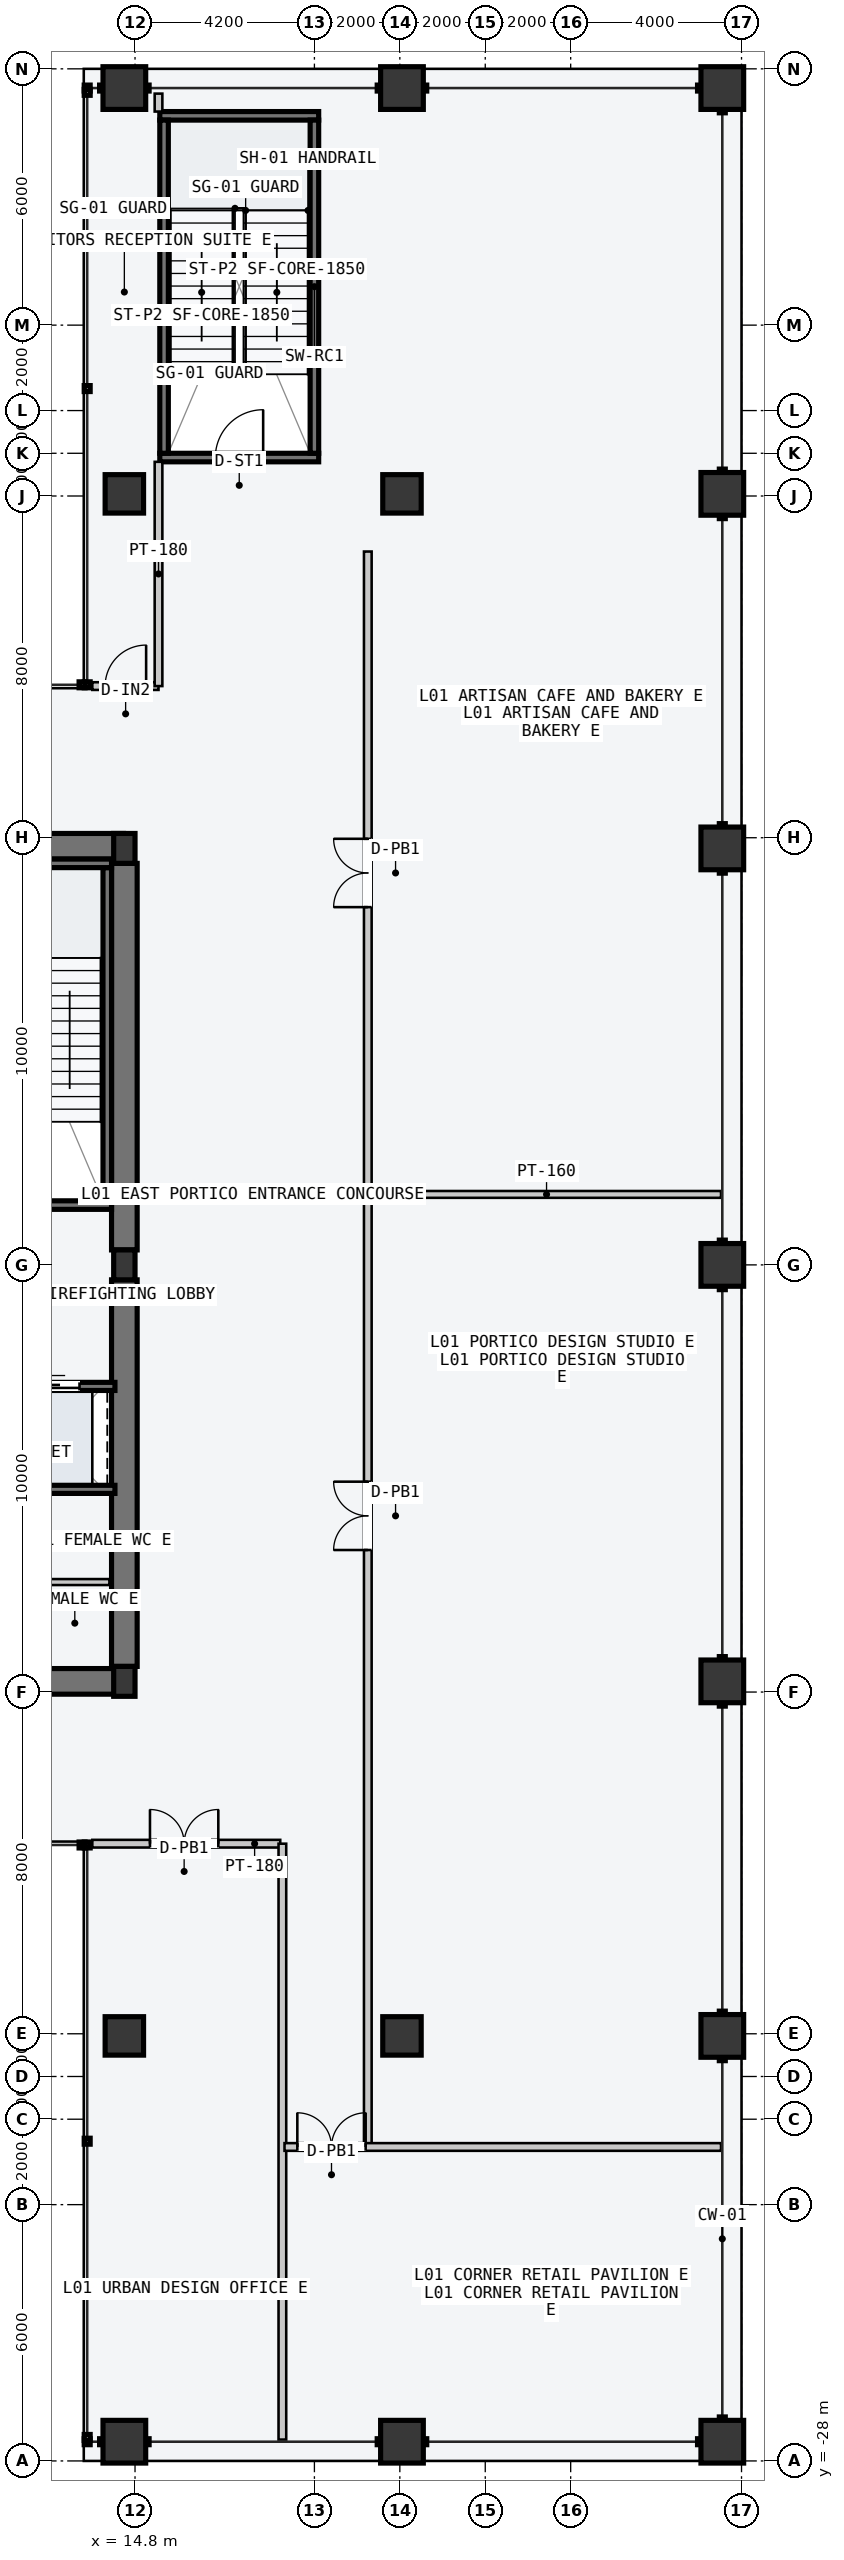
"""IFC4 building model, lengths in metres.
Left out: names, types, materials, properties, quantities, classifications, styles, units other than length and angle.
Written with IfcOpenShell. Run it as: python <this file> out.ifc"""

import sys

from ifc_helpers import new_model, si_unit, direction, frame, frame_2d, origin, origin_2d, place, context, subcontext, project, spatial, rectangle, hollow_rectangle, i_section, extrude, element, fill, save


model = new_model("IFC4")
c1 = context("Model", 3, precision=1e-05, world=origin(), true_north=direction((0.0, 1.0)))
c2 = subcontext(c1, "Body", "Model", "MODEL_VIEW")
j1 = project(units=[si_unit("LENGTHUNIT", "METRE"), si_unit("PLANEANGLEUNIT", "RADIAN")], contexts=[c1])
p1 = place(None, origin())
s1 = spatial("IfcSite", under=j1, at=p1, CompositionType="ELEMENT")
p2 = place(p1, origin())
s2 = spatial("IfcBuilding", under=s1, at=p2, CompositionType="ELEMENT")
p3 = place(p2, frame((0.0, 0.0, 4.8)))
s3 = spatial("IfcBuildingStorey", under=s2, at=p3, CompositionType="ELEMENT", Elevation=4.8)
for number, where, z_axis, x_axis in (
    (1, (8.07, -9.75, -0.22), (0.0, 0.0, 1.0), (1.0, 0.0, 0.0)),
    (2, (8.07, 9.8, -0.22), (0.0, 0.0, 1.0), (1.0, 0.0, 0.0)),
):
    element("IfcWall", number, at=place(p3, frame(where, z_axis=z_axis, x_axis=x_axis)), inside=s3, PredefinedType="SHEAR", context=c2, shape_type="SweptSolid", body=[
        extrude(rectangle(XDim=6.46, YDim=0.6, at=frame_2d((3.23, 0.0))), origin(), (0.0, 0.0, 1.0), 4.8),
    ])
for number, where, z_axis, x_axis in (
    (3, (14.55, -9.4, -0.22), (0.0, 0.0, 1.0), (0.0, 1.0, 0.0)),
    (4, (14.55, 0.35, -0.22), (0.0, 0.0, 1.0), (0.0, 1.0, 0.0)),
):
    element("IfcWall", number, at=place(p3, frame(where, z_axis=z_axis, x_axis=x_axis)), inside=s3, PredefinedType="SHEAR", context=c2, shape_type="SweptSolid", body=[
        extrude(rectangle(XDim=9.05, YDim=0.6, at=frame_2d((4.525, 0.0))), origin(), (0.0, 0.0, 1.0), 4.8),
    ])
p4 = place(p3, frame((14.15, 1.5, -0.22), z_axis=(0.0, 0.0, 1.0), x_axis=(0.0, 1.0, 0.0)))
e5 = element("IfcWall", 5, at=p4, inside=s3, PredefinedType="SOLIDWALL", context=c2, shape_type="SweptSolid", body=[
    extrude(rectangle(XDim=7.8, YDim=0.2, at=frame_2d((3.9, 0.0))), origin(), (0.0, 0.0, 1.0), 4.8),
])
p5 = place(p3, frame((10.15, 1.4, -0.22), z_axis=(0.0, 0.0, 1.0), x_axis=(1.0, 0.0, 0.0)))
e6 = element("IfcWall", 6, at=p5, inside=s3, PredefinedType="SOLIDWALL", context=c2, shape_type="SweptSolid", body=[
    extrude(rectangle(XDim=4.1, YDim=0.2, at=frame_2d((2.05, 0.0))), origin(), (0.0, 0.0, 1.0), 4.8),
])
p6 = place(p5, frame((1.5, 0.0, 0.22)))
e7 = element("IfcOpeningElement", 7, at=p6, cuts=e6, PredefinedType="OPENING", context=c2, shape_type="SweptSolid", body=[
    extrude(rectangle(XDim=1.12, YDim=2.18, at=frame_2d((0.56, 1.09))), frame((0.0, 0.11, 0.0), z_axis=(0.0, -1.0, 0.0), x_axis=(1.0, 0.0, 0.0)), (0.0, 0.0, 1.0), 0.22),
])
p7 = place(p3, frame((10.15, 9.4, -0.22), z_axis=(0.0, 0.0, 1.0), x_axis=(1.0, 0.0, 0.0)))
e8 = element("IfcWall", 8, at=p7, inside=s3, PredefinedType="SOLIDWALL", context=c2, shape_type="SweptSolid", body=[
    extrude(rectangle(XDim=4.1, YDim=0.2, at=frame_2d((2.05, 0.0))), origin(), (0.0, 0.0, 1.0), 4.8),
])
p8 = place(p3, frame((15.38, 18.9, -0.22), z_axis=(0.0, 0.0, 1.0), x_axis=(1.0, 0.0, 0.0)))
e9 = element("IfcWall", 9, at=p8, inside=s3, PredefinedType="SOLIDWALL", context=c2, shape_type="SweptSolid", body=[
    extrude(rectangle(XDim=3.72, YDim=0.2, at=frame_2d((1.86, 0.0))), origin(), (0.0, 0.0, 1.0), 4.8),
])
p9 = place(p8, frame((1.3, 0.0, 0.22)))
e10 = element("IfcOpeningElement", 10, at=p9, cuts=e9, PredefinedType="OPENING", context=c2, shape_type="SweptSolid", body=[
    extrude(rectangle(XDim=1.12, YDim=2.18, at=frame_2d((0.56, 1.09))), frame((0.0, 0.11, 0.0), z_axis=(0.0, -1.0, 0.0), x_axis=(1.0, 0.0, 0.0)), (0.0, 0.0, 1.0), 0.22),
])
p10 = place(p3, frame((15.38, 26.9, -0.22), z_axis=(0.0, 0.0, 1.0), x_axis=(1.0, 0.0, 0.0)))
e11 = element("IfcWall", 11, at=p10, inside=s3, PredefinedType="SOLIDWALL", context=c2, shape_type="SweptSolid", body=[
    extrude(rectangle(XDim=3.72, YDim=0.2, at=frame_2d((1.86, 0.0))), origin(), (0.0, 0.0, 1.0), 4.8),
])
for number, where, z_axis, x_axis in (
    (12, (15.48, 19.0, -0.22), (0.0, 0.0, 1.0), (0.0, 1.0, 0.0)),
    (13, (19.0, 19.0, -0.22), (0.0, 0.0, 1.0), (0.0, 1.0, 0.0)),
):
    element("IfcWall", number, at=place(p3, frame(where, z_axis=z_axis, x_axis=x_axis)), inside=s3, PredefinedType="SOLIDWALL", context=c2, shape_type="SweptSolid", body=[
        extrude(rectangle(XDim=7.8, YDim=0.2, at=frame_2d((3.9, 0.0))), origin(), (0.0, 0.0, 1.0), 4.8),
    ])
for number, where, z_axis, x_axis in (
    (14, (14.55, -9.75, 0.0), (0.0, 0.0, 1.0), (1.0, 0.0, 0.0)),
    (15, (14.55, 0.0, 0.0), (0.0, 0.0, 1.0), (1.0, 0.0, 0.0)),
    (16, (14.55, 9.75, 0.0), (0.0, 0.0, 1.0), (1.0, 0.0, 0.0)),
):
    element("IfcColumn", number, at=place(p3, frame(where, z_axis=z_axis, x_axis=x_axis)), inside=s3, PredefinedType="COLUMN", context=c2, shape_type="SweptSolid", body=[
        extrude(i_section(OverallWidth=0.5, OverallDepth=0.7, WebThickness=0.028, FlangeThickness=0.045, at=origin_2d()), origin(), (0.0, 0.0, 1.0), 4.8),
    ])
for number, where, z_axis, x_axis in (
    (17, (14.55, -18.05, 0.0), (0.0, 0.0, 1.0), (1.0, 0.0, 0.0)),
    (18, (21.05, -18.05, 0.0), (0.0, 0.0, 1.0), (1.0, 0.0, 0.0)),
    (19, (14.55, 18.05, 0.0), (0.0, 0.0, 1.0), (1.0, 0.0, 0.0)),
    (20, (21.05, 18.05, 0.0), (0.0, 0.0, 1.0), (1.0, 0.0, 0.0)),
):
    element("IfcColumn", number, at=place(p3, frame(where, z_axis=z_axis, x_axis=x_axis)), inside=s3, PredefinedType="COLUMN", context=c2, shape_type="SweptSolid", body=[
        extrude(hollow_rectangle(XDim=0.9, YDim=0.9, WallThickness=0.045, at=origin_2d()), origin(), (0.0, 0.0, 1.0), 4.8),
    ])
for number, where, z_axis, x_axis in (
    (21, (14.55, -27.55, 0.0), (0.0, 0.0, 1.0), (1.0, 0.0, 0.0)),
    (22, (21.05, -27.55, 0.0), (0.0, 0.0, 1.0), (1.0, 0.0, 0.0)),
    (23, (28.55, -27.55, 0.0), (0.0, 0.0, 1.0), (1.0, 0.0, 0.0)),
    (24, (14.55, 27.55, 0.0), (0.0, 0.0, 1.0), (1.0, 0.0, 0.0)),
    (25, (21.05, 27.55, 0.0), (0.0, 0.0, 1.0), (1.0, 0.0, 0.0)),
    (26, (28.55, 27.55, 0.0), (0.0, 0.0, 1.0), (1.0, 0.0, 0.0)),
    (27, (28.55, -18.05, 0.0), (0.0, 0.0, 1.0), (0.0, 1.0, 0.0)),
    (28, (28.55, -9.75, 0.0), (0.0, 0.0, 1.0), (0.0, 1.0, 0.0)),
    (29, (28.55, 0.0, 0.0), (0.0, 0.0, 1.0), (0.0, 1.0, 0.0)),
    (30, (28.55, 9.75, 0.0), (0.0, 0.0, 1.0), (0.0, 1.0, 0.0)),
    (31, (28.55, 18.05, 0.0), (0.0, 0.0, 1.0), (0.0, 1.0, 0.0)),
):
    element("IfcColumn", number, at=place(p3, frame(where, z_axis=z_axis, x_axis=x_axis)), inside=s3, PredefinedType="COLUMN", context=c2, shape_type="SweptSolid", body=[
        extrude(hollow_rectangle(XDim=1.0, YDim=1.0, WallThickness=0.05, at=origin_2d()), origin(), (0.0, 0.0, 1.0), 4.8),
    ])
p11 = place(p3, frame((11.65, -2.845, -0.22), z_axis=(0.0, 0.0, 1.0), x_axis=(1.0, 0.0, 0.0)))
e32 = element("IfcWall", 32, at=p11, inside=s3, PredefinedType="SOLIDWALL", context=c2, shape_type="SweptSolid", body=[
    extrude(rectangle(XDim=2.68, YDim=0.19, at=frame_2d((1.34, 0.0))), origin(), (0.0, 0.0, 1.0), 4.8),
])
p12 = place(p11, frame((0.65, 0.0, 0.22)))
e33 = element("IfcOpeningElement", 33, at=p12, cuts=e32, PredefinedType="OPENING", context=c2, shape_type="SweptSolid", body=[
    extrude(rectangle(XDim=1.2, YDim=2.2, at=frame_2d((0.6, 1.1))), frame((0.0, 0.105, 0.0), z_axis=(0.0, -1.0, 0.0), x_axis=(1.0, 0.0, 0.0)), (0.0, 0.0, 1.0), 0.21),
])
p13 = place(p3, frame((11.65, -5.255, -0.22), z_axis=(0.0, 0.0, 1.0), x_axis=(1.0, 0.0, 0.0)))
e34 = element("IfcWall", 34, at=p13, inside=s3, PredefinedType="SOLIDWALL", context=c2, shape_type="SweptSolid", body=[
    extrude(rectangle(XDim=2.68, YDim=0.19, at=frame_2d((1.34, 0.0))), origin(), (0.0, 0.0, 1.0), 4.8),
])
p14 = place(p3, frame((11.7, -7.425, 0.0), z_axis=(0.0, 0.0, 1.0), x_axis=(1.0, 0.0, 0.0)))
e35 = element("IfcWall", 35, at=p14, inside=s3, PredefinedType="PARTITIONING", context=c2, shape_type="SweptSolid", body=[
    extrude(rectangle(XDim=2.5, YDim=0.14, at=frame_2d((1.25, 0.0))), origin(), (0.0, 0.0, 1.0), 4.58),
])
p15 = place(p3, frame((20.35, 1.65, 0.0), z_axis=(0.0, 0.0, 1.0), x_axis=(1.0, 0.0, 0.0)))
e36 = element("IfcWall", 36, at=p15, inside=s3, PredefinedType="PARTITIONING", context=c2, shape_type="SweptSolid", body=[
    extrude(rectangle(XDim=8.17, YDim=0.16, at=frame_2d((4.085, 0.0))), origin(), (0.0, 0.0, 1.0), 4.58),
])
p16 = place(p3, frame((20.25, -20.6, 0.0), z_axis=(0.0, 0.0, 1.0), x_axis=(0.0, 1.0, 0.0)))
e37 = element("IfcWall", 37, at=p16, inside=s3, PredefinedType="PARTITIONING", context=c2, shape_type="SweptSolid", body=[
    extrude(rectangle(XDim=37.3, YDim=0.18, at=frame_2d((18.65, 0.0))), origin(), (0.0, 0.0, 1.0), 4.58),
])
p17 = place(p16, frame((13.925, 0.0, 0.0)))
e38 = element("IfcOpeningElement", 38, at=p17, cuts=e37, PredefinedType="OPENING", context=c2, shape_type="SweptSolid", body=[
    extrude(rectangle(XDim=1.6, YDim=2.3, at=frame_2d((0.8, 1.15))), frame((0.0, 0.1, 0.0), z_axis=(0.0, -1.0, 0.0), x_axis=(1.0, 0.0, 0.0)), (0.0, 0.0, 1.0), 0.2),
])
p18 = place(p16, frame((28.975, 0.0, 0.0)))
e39 = element("IfcOpeningElement", 39, at=p18, cuts=e37, PredefinedType="OPENING", context=c2, shape_type="SweptSolid", body=[
    extrude(rectangle(XDim=1.6, YDim=2.3, at=frame_2d((0.8, 1.15))), frame((0.0, 0.1, 0.0), z_axis=(0.0, -1.0, 0.0), x_axis=(1.0, 0.0, 0.0)), (0.0, 0.0, 1.0), 0.2),
])
p19 = place(p3, frame((13.8, -13.55, 0.0), z_axis=(0.0, 0.0, 1.0), x_axis=(1.0, 0.0, 0.0)))
e40 = element("IfcWall", 40, at=p19, inside=s3, PredefinedType="PARTITIONING", context=c2, shape_type="SweptSolid", body=[
    extrude(rectangle(XDim=4.4, YDim=0.18, at=frame_2d((2.2, 0.0))), origin(), (0.0, 0.0, 1.0), 4.58),
])
p20 = place(p19, frame((1.35, 0.0, 0.0)))
e41 = element("IfcOpeningElement", 41, at=p20, cuts=e40, PredefinedType="OPENING", context=c2, shape_type="SweptSolid", body=[
    extrude(rectangle(XDim=1.6, YDim=2.3, at=frame_2d((0.8, 1.15))), frame((0.0, 0.1, 0.0), z_axis=(0.0, -1.0, 0.0), x_axis=(1.0, 0.0, 0.0)), (0.0, 0.0, 1.0), 0.2),
])
p21 = place(p3, frame((18.25, -27.5, 0.0), z_axis=(0.0, 0.0, 1.0), x_axis=(0.0, 1.0, 0.0)))
e42 = element("IfcWall", 42, at=p21, inside=s3, PredefinedType="PARTITIONING", context=c2, shape_type="SweptSolid", body=[
    extrude(rectangle(XDim=13.95, YDim=0.18, at=frame_2d((6.975, 0.0))), origin(), (0.0, 0.0, 1.0), 4.58),
])
p22 = place(p3, frame((18.3, -20.65, 0.0), z_axis=(0.0, 0.0, 1.0), x_axis=(1.0, 0.0, 0.0)))
e43 = element("IfcWall", 43, at=p22, inside=s3, PredefinedType="PARTITIONING", context=c2, shape_type="SweptSolid", body=[
    extrude(rectangle(XDim=10.22, YDim=0.18, at=frame_2d((5.11, 0.0))), origin(), (0.0, 0.0, 1.0), 4.58),
])
p23 = place(p22, frame((0.3, 0.0, 0.0)))
e44 = element("IfcOpeningElement", 44, at=p23, cuts=e43, PredefinedType="OPENING", context=c2, shape_type="SweptSolid", body=[
    extrude(rectangle(XDim=1.6, YDim=2.3, at=frame_2d((0.8, 1.15))), frame((0.0, 0.1, 0.0), z_axis=(0.0, -1.0, 0.0), x_axis=(1.0, 0.0, 0.0)), (0.0, 0.0, 1.0), 0.2),
])
p24 = place(p3, frame((13.8, 13.55, 0.0), z_axis=(0.0, 0.0, 1.0), x_axis=(1.0, 0.0, 0.0)))
e45 = element("IfcWall", 45, at=p24, inside=s3, PredefinedType="PARTITIONING", context=c2, shape_type="SweptSolid", body=[
    extrude(rectangle(XDim=1.55, YDim=0.18, at=frame_2d((0.775, 0.0))), origin(), (0.0, 0.0, 1.0), 4.58),
])
p25 = place(p24, frame((0.3, 0.0, 0.0)))
e46 = element("IfcOpeningElement", 46, at=p25, cuts=e45, PredefinedType="OPENING", context=c2, shape_type="SweptSolid", body=[
    extrude(rectangle(XDim=0.96, YDim=2.18, at=frame_2d((0.48, 1.09))), frame((0.0, 0.1, 0.0), z_axis=(0.0, -1.0, 0.0), x_axis=(1.0, 0.0, 0.0)), (0.0, 0.0, 1.0), 0.2),
])
p26 = place(p3, frame((15.35, 13.55, 0.0), z_axis=(0.0, 0.0, 1.0), x_axis=(0.0, 1.0, 0.0)))
e47 = element("IfcWall", 47, at=p26, inside=s3, PredefinedType="PARTITIONING", context=c2, shape_type="SweptSolid", body=[
    extrude(rectangle(XDim=5.25, YDim=0.18, at=frame_2d((2.625, 0.0))), origin(), (0.0, 0.0, 1.0), 4.58),
])
p27 = place(p3, frame((15.35, 27.0, 0.0), z_axis=(0.0, 0.0, 1.0), x_axis=(0.0, 1.0, 0.0)))
e48 = element("IfcWall", 48, at=p27, inside=s3, PredefinedType="PARTITIONING", context=c2, shape_type="SweptSolid", body=[
    extrude(rectangle(XDim=0.42, YDim=0.18, at=frame_2d((0.21, 0.0))), origin(), (0.0, 0.0, 1.0), 4.58),
])
p28 = place(p9, origin())
e49 = element("IfcDoor", 49, at=p28, inside=s3, OperationType="SINGLE_SWING_RIGHT", PredefinedType="DOOR", context=c2, shape_type="SweptSolid", body=[
    extrude(rectangle(XDim=1.12, YDim=2.18, at=frame_2d((0.56, 1.09))), frame((0.0, 0.025, 0.0), z_axis=(0.0, -1.0, 0.0), x_axis=(1.0, 0.0, 0.0)), (0.0, 0.0, 1.0), 0.05),
])
fill(e10, e49)
p29 = place(p12, origin())
e50 = element("IfcDoor", 50, at=p29, inside=s3, OperationType="SLIDING_TO_LEFT", PredefinedType="DOOR", context=c2, shape_type="SweptSolid", body=[
    extrude(rectangle(XDim=1.2, YDim=2.2, at=frame_2d((0.6, 1.1))), frame((0.0, 0.025, 0.0), z_axis=(0.0, -1.0, 0.0), x_axis=(1.0, 0.0, 0.0)), (0.0, 0.0, 1.0), 0.05),
])
fill(e33, e50)
p30 = place(p17, origin())
e51 = element("IfcDoor", 51, at=p30, inside=s3, OperationType="DOUBLE_DOOR_SINGLE_SWING", PredefinedType="DOOR", context=c2, shape_type="SweptSolid", body=[
    extrude(rectangle(XDim=1.6, YDim=2.3, at=frame_2d((0.8, 1.15))), frame((0.0, 0.025, 0.0), z_axis=(0.0, -1.0, 0.0), x_axis=(1.0, 0.0, 0.0)), (0.0, 0.0, 1.0), 0.05),
])
fill(e38, e51)
p31 = place(p18, origin())
e52 = element("IfcDoor", 52, at=p31, inside=s3, OperationType="DOUBLE_DOOR_SINGLE_SWING", PredefinedType="DOOR", context=c2, shape_type="SweptSolid", body=[
    extrude(rectangle(XDim=1.6, YDim=2.3, at=frame_2d((0.8, 1.15))), frame((0.0, 0.025, 0.0), z_axis=(0.0, -1.0, 0.0), x_axis=(1.0, 0.0, 0.0)), (0.0, 0.0, 1.0), 0.05),
])
fill(e39, e52)
p32 = place(p20, origin())
e53 = element("IfcDoor", 53, at=p32, inside=s3, OperationType="DOUBLE_DOOR_SINGLE_SWING", PredefinedType="DOOR", context=c2, shape_type="SweptSolid", body=[
    extrude(rectangle(XDim=1.6, YDim=2.3, at=frame_2d((0.8, 1.15))), frame((0.0, 0.025, 0.0), z_axis=(0.0, -1.0, 0.0), x_axis=(1.0, 0.0, 0.0)), (0.0, 0.0, 1.0), 0.05),
])
fill(e41, e53)
p33 = place(p23, origin())
e54 = element("IfcDoor", 54, at=p33, inside=s3, OperationType="DOUBLE_DOOR_SINGLE_SWING", PredefinedType="DOOR", context=c2, shape_type="SweptSolid", body=[
    extrude(rectangle(XDim=1.6, YDim=2.3, at=frame_2d((0.8, 1.15))), frame((0.0, 0.025, 0.0), z_axis=(0.0, -1.0, 0.0), x_axis=(1.0, 0.0, 0.0)), (0.0, 0.0, 1.0), 0.05),
])
fill(e44, e54)
p34 = place(p25, origin())
e55 = element("IfcDoor", 55, at=p34, inside=s3, OperationType="SINGLE_SWING_RIGHT", PredefinedType="DOOR", context=c2, shape_type="SweptSolid", body=[
    extrude(rectangle(XDim=0.96, YDim=2.18, at=frame_2d((0.48, 1.09))), frame((0.0, 0.025, 0.0), z_axis=(0.0, -1.0, 0.0), x_axis=(1.0, 0.0, 0.0)), (0.0, 0.0, 1.0), 0.05),
])
fill(e46, e55)
save(model, sys.argv[1])
